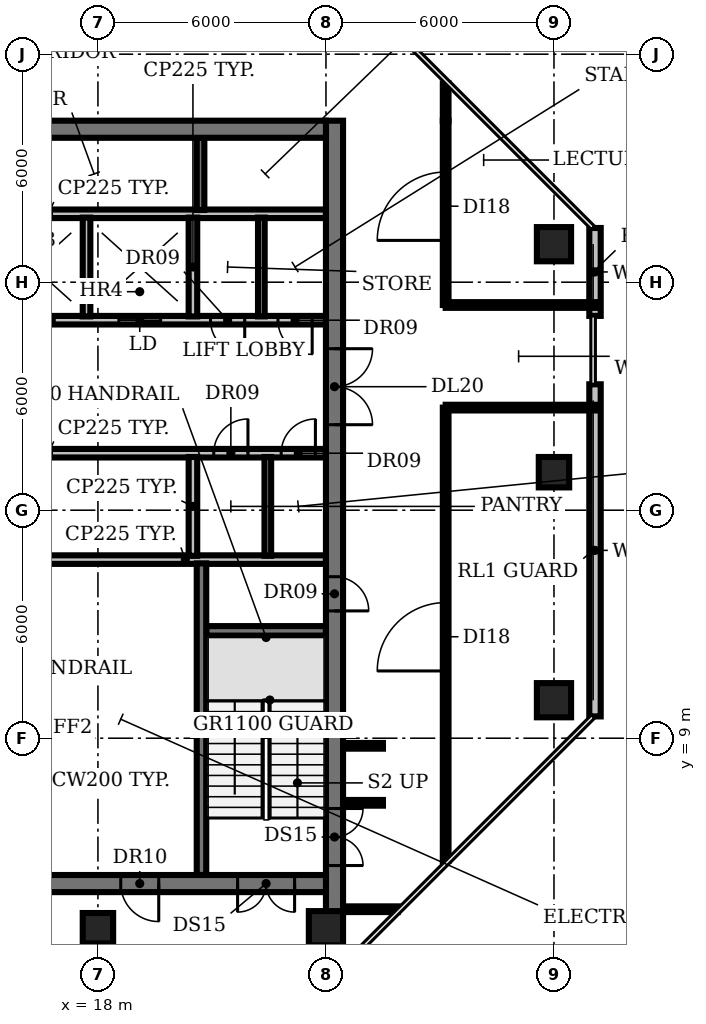
"""IFC4 building model, lengths in metres.
Left out: names, types, materials, properties, quantities, classifications, styles, units other than length and angle.
Written with IfcOpenShell. Run it as: python <this file> out.ifc"""

import sys

from ifc_helpers import new_model, si_unit, direction, frame, frame_2d, origin, origin_2d, place, context, subcontext, project, spatial, rectangle, circle, extrude, element, fill, save


model = new_model("IFC4")
c1 = context("Model", 3, precision=1e-05, world=origin(), true_north=direction((0.0, 1.0)))
c2 = subcontext(c1, "Body", "Model", "MODEL_VIEW")
j1 = project(units=[si_unit("LENGTHUNIT", "METRE"), si_unit("PLANEANGLEUNIT", "RADIAN")], contexts=[c1])
p1 = place(None, origin())
s1 = spatial("IfcSite", under=j1, at=p1, CompositionType="ELEMENT")
p2 = place(p1, origin())
s2 = spatial("IfcBuilding", under=s1, at=p2, CompositionType="ELEMENT")
p3 = place(p2, frame((0.0, 0.0, 247.4)))
s3 = spatial("IfcBuildingStorey", under=s2, at=p3, CompositionType="ELEMENT", Elevation=247.4)
p4 = place(p3, frame((18.0, 4.0, 0.0), z_axis=(0.0, 0.0, 1.0), x_axis=(1.0, 0.0, 0.0)))
e1 = element("IfcColumn", 1, at=p4, inside=s3, PredefinedType="COLUMN", context=c2, shape_type="SweptSolid", body=[
    extrude(rectangle(XDim=0.8, YDim=0.8, at=origin_2d()), origin(), (0.0, 0.0, 1.0), 3.85),
])
for number, where, z_axis, x_axis in (
    (2, (24.0, 4.0, 0.0), (0.0, 0.0, 1.0), (1.0, 0.0, 0.0)),
    (3, (30.0, 10.0, 0.0), (0.0, 0.0, 1.0), (1.0, 0.0, 0.0)),
):
    element("IfcColumn", number, at=place(p3, frame(where, z_axis=z_axis, x_axis=x_axis)), inside=s3, PredefinedType="COLUMN", context=c2, shape_type="SweptSolid", body=[
        extrude(circle(Radius=0.45, at=origin_2d()), origin(), (0.0, 0.0, 1.0), 3.85),
    ])
p5 = place(p3, frame((30.0, 16.0, 0.0), z_axis=(0.0, 0.0, 1.0), x_axis=(1.0, 0.0, 0.0)))
e4 = element("IfcColumn", 4, at=p5, inside=s3, PredefinedType="COLUMN", context=c2, shape_type="SweptSolid", body=[
    extrude(rectangle(XDim=0.8, YDim=0.8, at=origin_2d()), origin(), (0.0, 0.0, 1.0), 3.85),
])
p6 = place(p3, frame((30.0, 22.0, 0.0), z_axis=(0.0, 0.0, 1.0), x_axis=(1.0, 0.0, 0.0)))
e5 = element("IfcColumn", 5, at=p6, inside=s3, PredefinedType="COLUMN", context=c2, shape_type="SweptSolid", body=[
    extrude(circle(Radius=0.45, at=origin_2d()), origin(), (0.0, 0.0, 1.0), 3.85),
])
p7 = place(p3, frame((31.08, 9.573, 0.0), z_axis=(0.0, 0.0, 1.0), x_axis=(0.0, 1.0, 0.0)))
e6 = element("IfcWall", 6, at=p7, inside=s3, PredefinedType="SOLIDWALL", context=c2, shape_type="SweptSolid", body=[
    extrude(rectangle(XDim=8.74, YDim=0.3, at=frame_2d((4.37, 0.0))), origin(), (0.0, 0.0, 1.0), 3.85),
])
p8 = place(p3, frame((31.08, 20.113, 0.0), z_axis=(0.0, 0.0, 1.0), x_axis=(0.0, 1.0, 0.0)))
e7 = element("IfcWall", 7, at=p8, inside=s3, PredefinedType="SOLIDWALL", context=c2, shape_type="SweptSolid", body=[
    extrude(rectangle(XDim=2.313, YDim=0.3, at=frame_2d((1.157, 0.0))), origin(), (0.0, 0.0, 1.0), 3.85),
])
p9 = place(p3, frame((20.85, 11.825, 0.0), z_axis=(0.0, 0.0, 1.0), x_axis=(1.0, 0.0, 0.0)))
e8 = element("IfcWall", 8, at=p9, inside=s3, PredefinedType="SHEAR", context=c2, shape_type="SweptSolid", body=[
    extrude(rectangle(XDim=3.15, YDim=0.25, at=frame_2d((1.575, 0.0))), origin(), (0.0, 0.0, 1.0), 3.85),
])
p10 = place(p3, frame((16.6, 13.7, 0.0), z_axis=(0.0, 0.0, 1.0), x_axis=(1.0, 0.0, 0.0)))
e9 = element("IfcWall", 9, at=p10, inside=s3, PredefinedType="PARTITIONING", context=c2, shape_type="SweptSolid", body=[
    extrude(rectangle(XDim=7.4, YDim=0.225, at=frame_2d((3.7, 0.0))), origin(), (0.0, 0.0, 1.0), 3.85),
])
p11 = place(p3, frame((9.4, 16.5, 0.0), z_axis=(0.0, 0.0, 1.0), x_axis=(1.0, 0.0, 0.0)))
e10 = element("IfcWall", 10, at=p11, inside=s3, PredefinedType="PARTITIONING", context=c2, shape_type="SweptSolid", body=[
    extrude(rectangle(XDim=14.6, YDim=0.225, at=frame_2d((7.3, 0.0))), origin(), (0.0, 0.0, 1.0), 3.85),
])
p12 = place(p11, frame((0.55, 0.0, 0.0)))
e11 = element("IfcOpeningElement", 11, at=p12, cuts=e10, PredefinedType="OPENING", context=c2, shape_type="SweptSolid", body=[
    extrude(rectangle(XDim=0.9, YDim=2.1, at=frame_2d((0.45, 1.05))), frame((0.0, 0.123, 0.0), z_axis=(0.0, -1.0, 0.0), x_axis=(1.0, 0.0, 0.0)), (0.0, 0.0, 1.0), 0.245),
])
p13 = place(p11, frame((6.075, 0.0, 0.0)))
e12 = element("IfcOpeningElement", 12, at=p13, cuts=e10, PredefinedType="OPENING", context=c2, shape_type="SweptSolid", body=[
    extrude(rectangle(XDim=1.0, YDim=2.1, at=frame_2d((0.5, 1.05))), frame((0.0, 0.123, 0.0), z_axis=(0.0, -1.0, 0.0), x_axis=(1.0, 0.0, 0.0)), (0.0, 0.0, 1.0), 0.245),
])
p14 = place(p11, frame((11.647, 0.0, 0.0)))
e13 = element("IfcOpeningElement", 13, at=p14, cuts=e10, PredefinedType="OPENING", context=c2, shape_type="SweptSolid", body=[
    extrude(rectangle(XDim=0.9, YDim=2.1, at=frame_2d((0.45, 1.05))), frame((0.0, 0.123, 0.0), z_axis=(0.0, -1.0, 0.0), x_axis=(1.0, 0.0, 0.0)), (0.0, 0.0, 1.0), 0.245),
])
p15 = place(p11, frame((13.423, 0.0, 0.0)))
e14 = element("IfcOpeningElement", 14, at=p15, cuts=e10, PredefinedType="OPENING", context=c2, shape_type="SweptSolid", body=[
    extrude(rectangle(XDim=0.9, YDim=2.1, at=frame_2d((0.45, 1.05))), frame((0.0, 0.123, 0.0), z_axis=(0.0, -1.0, 0.0), x_axis=(1.0, 0.0, 0.0)), (0.0, 0.0, 1.0), 0.245),
])
p16 = place(p3, frame((24.0, 20.0, 0.0), z_axis=(0.0, 0.0, 1.0), x_axis=(-1.0, 0.0, 0.0)))
e15 = element("IfcWall", 15, at=p16, inside=s3, PredefinedType="PARTITIONING", context=c2, shape_type="SweptSolid", body=[
    extrude(rectangle(XDim=14.6, YDim=0.225, at=frame_2d((7.3, 0.0))), origin(), (0.0, 0.0, 1.0), 3.85),
])
p17 = place(p16, frame((12.75, 0.0, 0.0)))
e16 = element("IfcOpeningElement", 16, at=p17, cuts=e15, PredefinedType="OPENING", context=c2, shape_type="SweptSolid", body=[
    extrude(rectangle(XDim=1.1, YDim=2.1, at=frame_2d((0.55, 1.05))), frame((0.0, 0.123, 0.0), z_axis=(0.0, -1.0, 0.0), x_axis=(1.0, 0.0, 0.0)), (0.0, 0.0, 1.0), 0.245),
])
p18 = place(p16, frame((9.95, 0.0, 0.0)))
e17 = element("IfcOpeningElement", 17, at=p18, cuts=e15, PredefinedType="OPENING", context=c2, shape_type="SweptSolid", body=[
    extrude(rectangle(XDim=1.1, YDim=2.1, at=frame_2d((0.55, 1.05))), frame((0.0, 0.123, 0.0), z_axis=(0.0, -1.0, 0.0), x_axis=(1.0, 0.0, 0.0)), (0.0, 0.0, 1.0), 0.245),
])
p19 = place(p16, frame((7.15, 0.0, 0.0)))
e18 = element("IfcOpeningElement", 18, at=p19, cuts=e15, PredefinedType="OPENING", context=c2, shape_type="SweptSolid", body=[
    extrude(rectangle(XDim=1.1, YDim=2.1, at=frame_2d((0.55, 1.05))), frame((0.0, 0.123, 0.0), z_axis=(0.0, -1.0, 0.0), x_axis=(1.0, 0.0, 0.0)), (0.0, 0.0, 1.0), 0.245),
])
p20 = place(p16, frame((4.35, 0.0, 0.0)))
e19 = element("IfcOpeningElement", 19, at=p20, cuts=e15, PredefinedType="OPENING", context=c2, shape_type="SweptSolid", body=[
    extrude(rectangle(XDim=1.1, YDim=2.1, at=frame_2d((0.55, 1.05))), frame((0.0, 0.123, 0.0), z_axis=(0.0, -1.0, 0.0), x_axis=(1.0, 0.0, 0.0)), (0.0, 0.0, 1.0), 0.245),
])
p21 = place(p16, frame((2.137, 0.0, 0.0)))
e20 = element("IfcOpeningElement", 20, at=p21, cuts=e15, PredefinedType="OPENING", context=c2, shape_type="SweptSolid", body=[
    extrude(rectangle(XDim=0.9, YDim=2.1, at=frame_2d((0.45, 1.05))), frame((0.0, 0.123, 0.0), z_axis=(0.0, -1.0, 0.0), x_axis=(1.0, 0.0, 0.0)), (0.0, 0.0, 1.0), 0.245),
])
p22 = place(p16, frame((0.363, 0.0, 0.0)))
e21 = element("IfcOpeningElement", 21, at=p22, cuts=e15, PredefinedType="OPENING", context=c2, shape_type="SweptSolid", body=[
    extrude(rectangle(XDim=0.9, YDim=2.1, at=frame_2d((0.45, 1.05))), frame((0.0, 0.123, 0.0), z_axis=(0.0, -1.0, 0.0), x_axis=(1.0, 0.0, 0.0)), (0.0, 0.0, 1.0), 0.245),
])
p23 = place(p3, frame((9.4, 22.8, 0.0), z_axis=(0.0, 0.0, 1.0), x_axis=(1.0, 0.0, 0.0)))
e22 = element("IfcWall", 22, at=p23, inside=s3, PredefinedType="PARTITIONING", context=c2, shape_type="SweptSolid", body=[
    extrude(rectangle(XDim=14.6, YDim=0.225, at=frame_2d((7.3, 0.0))), origin(), (0.0, 0.0, 1.0), 3.85),
])
p24 = place(p3, frame((17.7, 20.1, 0.0), z_axis=(0.0, 0.0, 1.0), x_axis=(0.0, 1.0, 0.0)))
e23 = element("IfcWall", 23, at=p24, inside=s3, PredefinedType="SOLIDWALL", context=c2, shape_type="SweptSolid", body=[
    extrude(rectangle(XDim=2.6, YDim=0.2, at=frame_2d((1.3, 0.0))), origin(), (0.0, 0.0, 1.0), 3.85),
])
for number, where, z_axis, x_axis in (
    (24, (20.5, 13.8, 0.0), (0.0, 0.0, 1.0), (0.0, 1.0, 0.0)),
    (25, (20.5, 20.1, 0.0), (0.0, 0.0, 1.0), (0.0, 1.0, 0.0)),
):
    element("IfcWall", number, at=place(p3, frame(where, z_axis=z_axis, x_axis=x_axis)), inside=s3, PredefinedType="PARTITIONING", context=c2, shape_type="SweptSolid", body=[
        extrude(rectangle(XDim=2.6, YDim=0.225, at=frame_2d((1.3, 0.0))), origin(), (0.0, 0.0, 1.0), 3.85),
    ])
p25 = place(p3, frame((20.7, 22.9, 0.0), z_axis=(0.0, 0.0, 1.0), x_axis=(0.0, 1.0, 0.0)))
e26 = element("IfcWall", 26, at=p25, inside=s3, PredefinedType="SHEAR", context=c2, shape_type="SweptSolid", body=[
    extrude(rectangle(XDim=1.9, YDim=0.2, at=frame_2d((0.95, 0.0))), origin(), (0.0, 0.0, 1.0), 3.85),
])
p26 = place(p3, frame((20.725, 5.4, 0.0), z_axis=(0.0, 0.0, 1.0), x_axis=(0.0, 1.0, 0.0)))
e27 = element("IfcWall", 27, at=p26, inside=s3, PredefinedType="SHEAR", context=c2, shape_type="SweptSolid", body=[
    extrude(rectangle(XDim=8.2, YDim=0.25, at=frame_2d((4.1, 0.0))), origin(), (0.0, 0.0, 1.0), 3.85),
])
for number, where, z_axis, x_axis in (
    (28, (22.3, 20.1, 0.0), (0.0, 0.0, 1.0), (0.0, 1.0, 0.0)),
    (29, (22.47, 13.8, 0.0), (0.0, 0.0, 1.0), (0.0, 1.0, 0.0)),
):
    element("IfcWall", number, at=place(p3, frame(where, z_axis=z_axis, x_axis=x_axis)), inside=s3, PredefinedType="PARTITIONING", context=c2, shape_type="SweptSolid", body=[
        extrude(rectangle(XDim=2.6, YDim=0.175, at=frame_2d((1.3, 0.0))), origin(), (0.0, 0.0, 1.0), 3.85),
    ])
p27 = place(p3, frame((24.225, 25.25, 0.0), z_axis=(0.0, 0.0, 1.0), x_axis=(0.0, -1.0, 0.0)))
e30 = element("IfcWall", 30, at=p27, inside=s3, PredefinedType="SHEAR", context=c2, shape_type="SweptSolid", body=[
    extrude(rectangle(XDim=20.83, YDim=0.45, at=frame_2d((10.415, 0.0))), origin(), (0.0, 0.0, 1.0), 3.85),
])
p28 = place(p27, frame((18.1, 0.0, 0.0)))
e31 = element("IfcOpeningElement", 31, at=p28, cuts=e30, PredefinedType="OPENING", context=c2, shape_type="SweptSolid", body=[
    extrude(rectangle(XDim=1.5, YDim=2.1, at=frame_2d((0.75, 1.05))), frame((0.0, 0.235, 0.0), z_axis=(0.0, -1.0, 0.0), x_axis=(1.0, 0.0, 0.0)), (0.0, 0.0, 1.0), 0.47),
])
p29 = place(p27, frame((12.0, 0.0, 0.0)))
e32 = element("IfcOpeningElement", 32, at=p29, cuts=e30, PredefinedType="OPENING", context=c2, shape_type="SweptSolid", body=[
    extrude(rectangle(XDim=0.9, YDim=2.1, at=frame_2d((0.45, 1.05))), frame((0.0, 0.235, 0.0), z_axis=(0.0, -1.0, 0.0), x_axis=(1.0, 0.0, 0.0)), (0.0, 0.0, 1.0), 0.47),
])
p30 = place(p27, frame((6.0, 0.0, 0.0)))
e33 = element("IfcOpeningElement", 33, at=p30, cuts=e30, PredefinedType="OPENING", context=c2, shape_type="SweptSolid", body=[
    extrude(rectangle(XDim=2.0, YDim=2.1, at=frame_2d((1.0, 1.05))), frame((0.0, 0.235, 0.0), z_axis=(0.0, -1.0, 0.0), x_axis=(1.0, 0.0, 0.0)), (0.0, 0.0, 1.0), 0.47),
])
p31 = place(p3, frame((24.0, 5.175, 0.0), z_axis=(0.0, 0.0, 1.0), x_axis=(-1.0, 0.0, 0.0)))
e34 = element("IfcWall", 34, at=p31, inside=s3, PredefinedType="SHEAR", context=c2, shape_type="SweptSolid", body=[
    extrude(rectangle(XDim=18.0, YDim=0.45, at=frame_2d((9.0, 0.0))), origin(), (0.0, 0.0, 1.0), 3.85),
])
p32 = place(p31, frame((0.825, 0.0, 0.0)))
e35 = element("IfcOpeningElement", 35, at=p32, cuts=e34, PredefinedType="OPENING", context=c2, shape_type="SweptSolid", body=[
    extrude(rectangle(XDim=1.5, YDim=2.1, at=frame_2d((0.75, 1.05))), frame((0.0, 0.235, 0.0), z_axis=(0.0, -1.0, 0.0), x_axis=(1.0, 0.0, 0.0)), (0.0, 0.0, 1.0), 0.47),
])
p33 = place(p31, frame((15.675, 0.0, 0.0)))
e36 = element("IfcOpeningElement", 36, at=p33, cuts=e34, PredefinedType="OPENING", context=c2, shape_type="SweptSolid", body=[
    extrude(rectangle(XDim=1.5, YDim=2.1, at=frame_2d((0.75, 1.05))), frame((0.0, 0.235, 0.0), z_axis=(0.0, -1.0, 0.0), x_axis=(1.0, 0.0, 0.0)), (0.0, 0.0, 1.0), 0.47),
])
p34 = place(p31, frame((13.0, 0.0, 0.0)))
e37 = element("IfcOpeningElement", 37, at=p34, cuts=e34, PredefinedType="OPENING", context=c2, shape_type="SweptSolid", body=[
    extrude(rectangle(XDim=1.2, YDim=2.1, at=frame_2d((0.6, 1.05))), frame((0.0, 0.235, 0.0), z_axis=(0.0, -1.0, 0.0), x_axis=(1.0, 0.0, 0.0)), (0.0, 0.0, 1.0), 0.47),
])
p35 = place(p31, frame((4.4, 0.0, 0.0)))
e38 = element("IfcOpeningElement", 38, at=p35, cuts=e34, PredefinedType="OPENING", context=c2, shape_type="SweptSolid", body=[
    extrude(rectangle(XDim=1.0, YDim=2.1, at=frame_2d((0.5, 1.05))), frame((0.0, 0.235, 0.0), z_axis=(0.0, -1.0, 0.0), x_axis=(1.0, 0.0, 0.0)), (0.0, 0.0, 1.0), 0.47),
])
p36 = place(p3, frame((6.0, 25.025, 0.0), z_axis=(0.0, 0.0, 1.0), x_axis=(1.0, 0.0, 0.0)))
e39 = element("IfcWall", 39, at=p36, inside=s3, PredefinedType="SHEAR", context=c2, shape_type="SweptSolid", body=[
    extrude(rectangle(XDim=18.0, YDim=0.45, at=frame_2d((9.0, 0.0))), origin(), (0.0, 0.0, 1.0), 3.85),
])
for number, where, z_axis, x_axis in (
    (40, (24.45, 7.3, 0.0), (0.0, 0.0, 1.0), (1.0, 0.0, 0.0)),
    (41, (24.45, 8.8, 0.0), (0.0, 0.0, 1.0), (1.0, 0.0, 0.0)),
):
    element("IfcWall", number, at=place(p3, frame(where, z_axis=z_axis, x_axis=x_axis)), inside=s3, PredefinedType="PARTITIONING", context=c2, shape_type="SweptSolid", body=[
        extrude(rectangle(XDim=1.05, YDim=0.15, at=frame_2d((0.525, 0.0))), origin(), (0.0, 0.0, 1.0), 2.88),
    ])
p37 = place(p3, frame((24.55, 4.5, 0.0), z_axis=(0.0, 0.0, 1.0), x_axis=(1.0, 0.0, 0.0)))
e42 = element("IfcWall", 42, at=p37, inside=s3, PredefinedType="PARTITIONING", context=c2, shape_type="SweptSolid", body=[
    extrude(rectangle(XDim=1.34, YDim=0.15, at=frame_2d((0.67, 0.0))), origin(), (0.0, 0.0, 1.0), 2.88),
])
p38 = place(p3, frame((27.15, 5.77, 0.0), z_axis=(0.0, 0.0, 1.0), x_axis=(0.0, 1.0, 0.0)))
e43 = element("IfcWall", 43, at=p38, inside=s3, PredefinedType="PARTITIONING", context=c2, shape_type="SweptSolid", body=[
    extrude(rectangle(XDim=11.93, YDim=0.15, at=frame_2d((5.965, 0.0))), origin(), (0.0, 0.0, 1.0), 2.88),
])
p39 = place(p38, frame((5.0, 0.0, 0.0)))
e44 = element("IfcOpeningElement", 44, at=p39, cuts=e43, PredefinedType="OPENING", context=c2, shape_type="SweptSolid", body=[
    extrude(rectangle(XDim=1.8, YDim=2.1, at=frame_2d((0.9, 1.05))), frame((0.0, 0.085, 0.0), z_axis=(0.0, -1.0, 0.0), x_axis=(1.0, 0.0, 0.0)), (0.0, 0.0, 1.0), 0.17),
])
p40 = place(p3, frame((27.15, 17.7, 0.0), z_axis=(0.0, 0.0, 1.0), x_axis=(1.0, 0.0, 0.0)))
e45 = element("IfcWall", 45, at=p40, inside=s3, PredefinedType="PARTITIONING", context=c2, shape_type="SweptSolid", body=[
    extrude(rectangle(XDim=3.94, YDim=0.15, at=frame_2d((1.97, 0.0))), origin(), (0.0, 0.0, 1.0), 2.88),
])
p41 = place(p3, frame((27.15, 20.4, 0.0), z_axis=(0.0, 0.0, 1.0), x_axis=(0.0, 1.0, 0.0)))
e46 = element("IfcWall", 46, at=p41, inside=s3, PredefinedType="PARTITIONING", context=c2, shape_type="SweptSolid", body=[
    extrude(rectangle(XDim=4.85, YDim=0.15, at=frame_2d((2.425, 0.0))), origin(), (0.0, 0.0, 1.0), 2.88),
])
p42 = place(p41, frame((1.7, 0.0, 0.0)))
e47 = element("IfcOpeningElement", 47, at=p42, cuts=e46, PredefinedType="OPENING", context=c2, shape_type="SweptSolid", body=[
    extrude(rectangle(XDim=1.8, YDim=2.1, at=frame_2d((0.9, 1.05))), frame((0.0, 0.085, 0.0), z_axis=(0.0, -1.0, 0.0), x_axis=(1.0, 0.0, 0.0)), (0.0, 0.0, 1.0), 0.17),
])
p43 = place(p3, frame((27.15, 20.4, 0.0), z_axis=(0.0, 0.0, 1.0), x_axis=(1.0, 0.0, 0.0)))
e48 = element("IfcWall", 48, at=p43, inside=s3, PredefinedType="PARTITIONING", context=c2, shape_type="SweptSolid", body=[
    extrude(rectangle(XDim=3.94, YDim=0.15, at=frame_2d((1.97, 0.0))), origin(), (0.0, 0.0, 1.0), 2.88),
])
p44 = place(p3, frame((27.15, 25.25, 0.0), z_axis=(0.0, 0.0, 1.0), x_axis=(0.0, 1.0, 0.0)))
e49 = element("IfcWall", 49, at=p44, inside=s3, PredefinedType="PARTITIONING", context=c2, shape_type="SweptSolid", body=[
    extrude(rectangle(XDim=0.98, YDim=0.15, at=frame_2d((0.49, 0.0))), origin(), (0.0, 0.0, 1.0), 2.88),
])
p45 = place(p14, origin())
e50 = element("IfcDoor", 50, at=p45, inside=s3, OperationType="SINGLE_SWING_RIGHT", PredefinedType="DOOR", context=c2, shape_type="SweptSolid", body=[
    extrude(rectangle(XDim=0.9, YDim=2.1, at=frame_2d((0.45, 1.05))), frame((0.0, 0.025, 0.0), z_axis=(0.0, -1.0, 0.0), x_axis=(1.0, 0.0, 0.0)), (0.0, 0.0, 1.0), 0.05),
])
fill(e13, e50)
p46 = place(p15, origin())
e51 = element("IfcDoor", 51, at=p46, inside=s3, OperationType="SINGLE_SWING_RIGHT", PredefinedType="DOOR", context=c2, shape_type="SweptSolid", body=[
    extrude(rectangle(XDim=0.9, YDim=2.1, at=frame_2d((0.45, 1.05))), frame((0.0, 0.025, 0.0), z_axis=(0.0, -1.0, 0.0), x_axis=(1.0, 0.0, 0.0)), (0.0, 0.0, 1.0), 0.05),
])
fill(e14, e51)
p47 = place(p19, origin())
e52 = element("IfcDoor", 52, at=p47, inside=s3, OperationType="DOUBLE_DOOR_SLIDING", PredefinedType="DOOR", context=c2, shape_type="SweptSolid", body=[
    extrude(rectangle(XDim=1.1, YDim=2.1, at=frame_2d((0.55, 1.05))), frame((0.0, 0.025, 0.0), z_axis=(0.0, -1.0, 0.0), x_axis=(1.0, 0.0, 0.0)), (0.0, 0.0, 1.0), 0.05),
])
fill(e18, e52)
p48 = place(p20, origin())
e53 = element("IfcDoor", 53, at=p48, inside=s3, OperationType="DOUBLE_DOOR_SLIDING", PredefinedType="DOOR", context=c2, shape_type="SweptSolid", body=[
    extrude(rectangle(XDim=1.1, YDim=2.1, at=frame_2d((0.55, 1.05))), frame((0.0, 0.025, 0.0), z_axis=(0.0, -1.0, 0.0), x_axis=(1.0, 0.0, 0.0)), (0.0, 0.0, 1.0), 0.05),
])
fill(e19, e53)
p49 = place(p21, origin())
e54 = element("IfcDoor", 54, at=p49, inside=s3, OperationType="SINGLE_SWING_LEFT", PredefinedType="DOOR", context=c2, shape_type="SweptSolid", body=[
    extrude(rectangle(XDim=0.9, YDim=2.1, at=frame_2d((0.45, 1.05))), frame((0.0, 0.025, 0.0), z_axis=(0.0, -1.0, 0.0), x_axis=(1.0, 0.0, 0.0)), (0.0, 0.0, 1.0), 0.05),
])
fill(e20, e54)
p50 = place(p22, origin())
e55 = element("IfcDoor", 55, at=p50, inside=s3, OperationType="SINGLE_SWING_LEFT", PredefinedType="DOOR", context=c2, shape_type="SweptSolid", body=[
    extrude(rectangle(XDim=0.9, YDim=2.1, at=frame_2d((0.45, 1.05))), frame((0.0, 0.025, 0.0), z_axis=(0.0, -1.0, 0.0), x_axis=(1.0, 0.0, 0.0)), (0.0, 0.0, 1.0), 0.05),
])
fill(e21, e55)
p51 = place(p28, origin())
e56 = element("IfcDoor", 56, at=p51, inside=s3, OperationType="DOUBLE_DOOR_SINGLE_SWING", PredefinedType="DOOR", context=c2, shape_type="SweptSolid", body=[
    extrude(rectangle(XDim=1.5, YDim=2.1, at=frame_2d((0.75, 1.05))), frame((0.0, 0.025, 0.0), z_axis=(0.0, -1.0, 0.0), x_axis=(1.0, 0.0, 0.0)), (0.0, 0.0, 1.0), 0.05),
])
fill(e31, e56)
p52 = place(p29, origin())
e57 = element("IfcDoor", 57, at=p52, inside=s3, OperationType="SINGLE_SWING_RIGHT", PredefinedType="DOOR", context=c2, shape_type="SweptSolid", body=[
    extrude(rectangle(XDim=0.9, YDim=2.1, at=frame_2d((0.45, 1.05))), frame((0.0, 0.025, 0.0), z_axis=(0.0, -1.0, 0.0), x_axis=(1.0, 0.0, 0.0)), (0.0, 0.0, 1.0), 0.05),
])
fill(e32, e57)
p53 = place(p30, origin())
e58 = element("IfcDoor", 58, at=p53, inside=s3, OperationType="DOUBLE_DOOR_SINGLE_SWING", PredefinedType="DOOR", context=c2, shape_type="SweptSolid", body=[
    extrude(rectangle(XDim=2.0, YDim=2.1, at=frame_2d((1.0, 1.05))), frame((0.0, 0.025, 0.0), z_axis=(0.0, -1.0, 0.0), x_axis=(1.0, 0.0, 0.0)), (0.0, 0.0, 1.0), 0.05),
])
fill(e33, e58)
p54 = place(p32, origin())
e59 = element("IfcDoor", 59, at=p54, inside=s3, OperationType="DOUBLE_DOOR_SINGLE_SWING", PredefinedType="DOOR", context=c2, shape_type="SweptSolid", body=[
    extrude(rectangle(XDim=1.5, YDim=2.1, at=frame_2d((0.75, 1.05))), frame((0.0, 0.025, 0.0), z_axis=(0.0, -1.0, 0.0), x_axis=(1.0, 0.0, 0.0)), (0.0, 0.0, 1.0), 0.05),
])
fill(e35, e59)
p55 = place(p35, origin())
e60 = element("IfcDoor", 60, at=p55, inside=s3, OperationType="SINGLE_SWING_LEFT", PredefinedType="DOOR", context=c2, shape_type="SweptSolid", body=[
    extrude(rectangle(XDim=1.0, YDim=2.1, at=frame_2d((0.5, 1.05))), frame((0.0, 0.025, 0.0), z_axis=(0.0, -1.0, 0.0), x_axis=(1.0, 0.0, 0.0)), (0.0, 0.0, 1.0), 0.05),
])
fill(e38, e60)
p56 = place(p39, origin())
e61 = element("IfcDoor", 61, at=p56, inside=s3, OperationType="SINGLE_SWING_LEFT", PredefinedType="DOOR", context=c2, shape_type="SweptSolid", body=[
    extrude(rectangle(XDim=1.8, YDim=2.1, at=frame_2d((0.9, 1.05))), frame((0.0, 0.025, 0.0), z_axis=(0.0, -1.0, 0.0), x_axis=(1.0, 0.0, 0.0)), (0.0, 0.0, 1.0), 0.05),
])
fill(e44, e61)
p57 = place(p42, origin())
e62 = element("IfcDoor", 62, at=p57, inside=s3, OperationType="SINGLE_SWING_LEFT", PredefinedType="DOOR", context=c2, shape_type="SweptSolid", body=[
    extrude(rectangle(XDim=1.8, YDim=2.1, at=frame_2d((0.9, 1.05))), frame((0.0, 0.025, 0.0), z_axis=(0.0, -1.0, 0.0), x_axis=(1.0, 0.0, 0.0)), (0.0, 0.0, 1.0), 0.05),
])
fill(e47, e62)
save(model, sys.argv[1])
